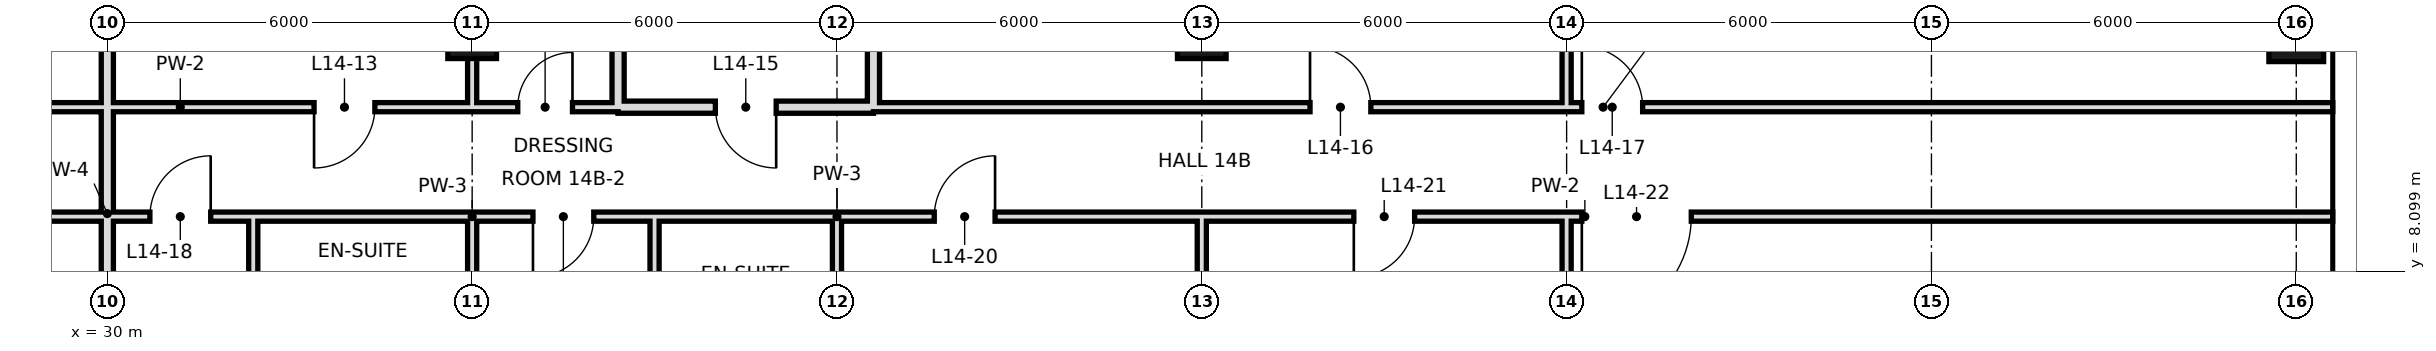
"""IFC4 building model, lengths in metres.
Left out: names, types, materials, properties, quantities, classifications, styles, units other than length and angle.
Written with IfcOpenShell. Run it as: python <this file> out.ifc"""

import sys

from ifc_helpers import new_model, si_unit, direction, frame, frame_2d, origin, origin_2d, place, context, subcontext, project, spatial, rectangle, hollow_rectangle, extrude, element, fill, save


model = new_model("IFC4")
c1 = context("Model", 3, precision=1e-05, world=origin(), true_north=direction((0.0, 1.0)))
c2 = subcontext(c1, "Body", "Model", "MODEL_VIEW")
j1 = project(units=[si_unit("LENGTHUNIT", "METRE"), si_unit("PLANEANGLEUNIT", "RADIAN")], contexts=[c1])
p1 = place(None, origin())
s1 = spatial("IfcSite", under=j1, at=p1, CompositionType="ELEMENT")
p2 = place(p1, origin())
s2 = spatial("IfcBuilding", under=s1, at=p2, CompositionType="ELEMENT")
p3 = place(p2, frame((0.0, 0.0, 71.4)))
s3 = spatial("IfcBuildingStorey", under=s2, at=p3, CompositionType="ELEMENT", Elevation=71.4)
for number, where, z_axis, x_axis in (
    (1, (36.0, 12.0, 0.0), (0.0, 0.0, 1.0), (1.0, 0.0, 0.0)),
    (2, (48.0, 12.0, 0.0), (0.0, 0.0, 1.0), (1.0, 0.0, 0.0)),
):
    element("IfcColumn", number, at=place(p3, frame(where, z_axis=z_axis, x_axis=x_axis)), inside=s3, PredefinedType="COLUMN", context=c2, shape_type="SweptSolid", body=[
        extrude(hollow_rectangle(XDim=0.8, YDim=0.8, WallThickness=0.04, at=origin_2d()), origin(), (0.0, 0.0, 1.0), 3.6),
    ])
p4 = place(p3, frame((66.0, 12.0, 0.0), z_axis=(0.0, 0.0, 1.0), x_axis=(1.0, 0.0, 0.0)))
e3 = element("IfcColumn", 3, at=p4, inside=s3, PredefinedType="COLUMN", context=c2, shape_type="SweptSolid", body=[
    extrude(hollow_rectangle(XDim=0.9, YDim=0.9, WallThickness=0.045, at=origin_2d()), origin(), (0.0, 0.0, 1.0), 3.6),
])
p5 = place(p3, frame((30.0, -0.6, 0.0), z_axis=(0.0, 0.0, 1.0), x_axis=(0.0, 1.0, 0.0)))
e4 = element("IfcWall", 4, at=p5, inside=s3, PredefinedType="SOLIDWALL", context=c2, shape_type="SweptSolid", body=[
    extrude(rectangle(XDim=19.3, YDim=0.2, at=frame_2d((9.65, 0.0))), origin(), (0.0, 0.0, 1.0), 2.72),
])
p6 = place(p3, frame((32.4, 6.0, 0.0), z_axis=(0.0, 0.0, 1.0), x_axis=(0.0, 1.0, 0.0)))
e5 = element("IfcWall", 5, at=p6, inside=s3, PredefinedType="PARTITIONING", context=c2, shape_type="SweptSolid", body=[
    extrude(rectangle(XDim=3.0, YDim=0.15, at=frame_2d((1.5, 0.0))), origin(), (0.0, 0.0, 1.0), 3.42),
])
p7 = place(p3, frame((36.0, 6.0, 0.0), z_axis=(0.0, 0.0, 1.0), x_axis=(0.0, 1.0, 0.0)))
e6 = element("IfcWall", 6, at=p7, inside=s3, PredefinedType="PARTITIONING", context=c2, shape_type="SweptSolid", body=[
    extrude(rectangle(XDim=3.0, YDim=0.15, at=frame_2d((1.5, 0.0))), origin(), (0.0, 0.0, 1.0), 2.72),
])
p8 = place(p3, frame((36.0, 10.8, 0.0), z_axis=(0.0, 0.0, 1.0), x_axis=(0.0, 1.0, 0.0)))
e7 = element("IfcWall", 7, at=p8, inside=s3, PredefinedType="PARTITIONING", context=c2, shape_type="SweptSolid", body=[
    extrude(rectangle(XDim=7.9, YDim=0.15, at=frame_2d((3.95, 0.0))), origin(), (0.0, 0.0, 1.0), 2.72),
])
p9 = place(p3, frame((38.4, 10.8, 0.0), z_axis=(0.0, 0.0, 1.0), x_axis=(0.0, 1.0, 0.0)))
e8 = element("IfcWall", 8, at=p9, inside=s3, PredefinedType="SOLIDWALL", context=c2, shape_type="SweptSolid", body=[
    extrude(rectangle(XDim=7.9, YDim=0.2, at=frame_2d((3.95, 0.0))), origin(), (0.0, 0.0, 1.0), 2.72),
])
p10 = place(p3, frame((39.0, 6.0, 0.0), z_axis=(0.0, 0.0, 1.0), x_axis=(0.0, 1.0, 0.0)))
e9 = element("IfcWall", 9, at=p10, inside=s3, PredefinedType="PARTITIONING", context=c2, shape_type="SweptSolid", body=[
    extrude(rectangle(XDim=3.0, YDim=0.15, at=frame_2d((1.5, 0.0))), origin(), (0.0, 0.0, 1.0), 3.42),
])
p11 = place(p3, frame((42.0, 6.0, 0.0), z_axis=(0.0, 0.0, 1.0), x_axis=(0.0, 1.0, 0.0)))
e10 = element("IfcWall", 10, at=p11, inside=s3, PredefinedType="PARTITIONING", context=c2, shape_type="SweptSolid", body=[
    extrude(rectangle(XDim=3.0, YDim=0.15, at=frame_2d((1.5, 0.0))), origin(), (0.0, 0.0, 1.0), 2.72),
])
p12 = place(p3, frame((42.6, 10.8, 0.0), z_axis=(0.0, 0.0, 1.0), x_axis=(0.0, 1.0, 0.0)))
e11 = element("IfcWall", 11, at=p12, inside=s3, PredefinedType="SOLIDWALL", context=c2, shape_type="SweptSolid", body=[
    extrude(rectangle(XDim=7.9, YDim=0.2, at=frame_2d((3.95, 0.0))), origin(), (0.0, 0.0, 1.0), 2.72),
])
p13 = place(p3, frame((48.0, 0.0, 0.0), z_axis=(0.0, 0.0, 1.0), x_axis=(0.0, 1.0, 0.0)))
e12 = element("IfcWall", 12, at=p13, inside=s3, PredefinedType="PARTITIONING", context=c2, shape_type="SweptSolid", body=[
    extrude(rectangle(XDim=9.0, YDim=0.15, at=frame_2d((4.5, 0.0))), origin(), (0.0, 0.0, 1.0), 2.72),
])
p14 = place(p3, frame((54.0, -0.6, 0.0), z_axis=(0.0, 0.0, 1.0), x_axis=(0.0, 1.0, 0.0)))
e13 = element("IfcWall", 13, at=p14, inside=s3, PredefinedType="PARTITIONING", context=c2, shape_type="SweptSolid", body=[
    extrude(rectangle(XDim=9.6, YDim=0.15, at=frame_2d((4.8, 0.0))), origin(), (0.0, 0.0, 1.0), 3.42),
])
p15 = place(p3, frame((54.0, 10.8, 0.0), z_axis=(0.0, 0.0, 1.0), x_axis=(0.0, 1.0, 0.0)))
e14 = element("IfcWall", 14, at=p15, inside=s3, PredefinedType="PARTITIONING", context=c2, shape_type="SweptSolid", body=[
    extrude(rectangle(XDim=7.2, YDim=0.15, at=frame_2d((3.6, 0.0))), origin(), (0.0, 0.0, 1.0), 3.42),
])
p16 = place(p3, frame((38.4, 10.8, 0.0), z_axis=(0.0, 0.0, 1.0), x_axis=(1.0, 0.0, 0.0)))
e15 = element("IfcWall", 15, at=p16, inside=s3, PredefinedType="SOLIDWALL", context=c2, shape_type="SweptSolid", body=[
    extrude(rectangle(XDim=4.2, YDim=0.2, at=frame_2d((2.1, 0.0))), origin(), (0.0, 0.0, 1.0), 2.72),
])
p17 = place(p16, frame((1.6, 0.0, 0.0)))
e16 = element("IfcOpeningElement", 16, at=p17, cuts=e15, PredefinedType="OPENING", context=c2, shape_type="SweptSolid", body=[
    extrude(rectangle(XDim=1.0, YDim=2.4, at=frame_2d((0.5, 1.2))), frame((0.0, 0.11, 0.0), z_axis=(0.0, -1.0, 0.0), x_axis=(1.0, 0.0, 0.0)), (0.0, 0.0, 1.0), 0.22),
])
p18 = place(p3, frame((26.4, 10.8, 0.0), z_axis=(0.0, 0.0, 1.0), x_axis=(1.0, 0.0, 0.0)))
e17 = element("IfcWall", 17, at=p18, inside=s3, PredefinedType="PARTITIONING", context=c2, shape_type="SweptSolid", body=[
    extrude(rectangle(XDim=9.6, YDim=0.15, at=frame_2d((4.8, 0.0))), origin(), (0.0, 0.0, 1.0), 3.42),
])
p19 = place(p18, frame((1.3, 0.0, 0.0)))
e18 = element("IfcOpeningElement", 18, at=p19, cuts=e17, PredefinedType="OPENING", context=c2, shape_type="SweptSolid", body=[
    extrude(rectangle(XDim=1.0, YDim=2.4, at=frame_2d((0.5, 1.2))), frame((0.0, 0.085, 0.0), z_axis=(0.0, -1.0, 0.0), x_axis=(1.0, 0.0, 0.0)), (0.0, 0.0, 1.0), 0.17),
])
p20 = place(p18, frame((7.0, 0.0, 0.0)))
e19 = element("IfcOpeningElement", 19, at=p20, cuts=e17, PredefinedType="OPENING", context=c2, shape_type="SweptSolid", body=[
    extrude(rectangle(XDim=1.0, YDim=2.4, at=frame_2d((0.5, 1.2))), frame((0.0, 0.085, 0.0), z_axis=(0.0, -1.0, 0.0), x_axis=(1.0, 0.0, 0.0)), (0.0, 0.0, 1.0), 0.17),
])
p21 = place(p3, frame((42.6, 10.8, 0.0), z_axis=(0.0, 0.0, 1.0), x_axis=(1.0, 0.0, 0.0)))
e20 = element("IfcWall", 20, at=p21, inside=s3, PredefinedType="PARTITIONING", context=c2, shape_type="SweptSolid", body=[
    extrude(rectangle(XDim=24.0, YDim=0.15, at=frame_2d((12.0, 0.0))), origin(), (0.0, 0.0, 1.0), 3.42),
])
p22 = place(p21, frame((7.18, 0.0, 0.0)))
e21 = element("IfcOpeningElement", 21, at=p22, cuts=e20, PredefinedType="OPENING", context=c2, shape_type="SweptSolid", body=[
    extrude(rectangle(XDim=1.0, YDim=2.4, at=frame_2d((0.5, 1.2))), frame((0.0, 0.085, 0.0), z_axis=(0.0, -1.0, 0.0), x_axis=(1.0, 0.0, 0.0)), (0.0, 0.0, 1.0), 0.17),
])
p23 = place(p21, frame((11.65, 0.0, 0.0)))
e22 = element("IfcOpeningElement", 22, at=p23, cuts=e20, PredefinedType="OPENING", context=c2, shape_type="SweptSolid", body=[
    extrude(rectangle(XDim=1.0, YDim=2.4, at=frame_2d((0.5, 1.2))), frame((0.0, 0.085, 0.0), z_axis=(0.0, -1.0, 0.0), x_axis=(1.0, 0.0, 0.0)), (0.0, 0.0, 1.0), 0.17),
])
p24 = place(p3, frame((36.0, 10.8, 0.0), z_axis=(0.0, 0.0, 1.0), x_axis=(1.0, 0.0, 0.0)))
e23 = element("IfcWall", 23, at=p24, inside=s3, PredefinedType="PARTITIONING", context=c2, shape_type="SweptSolid", body=[
    extrude(rectangle(XDim=2.4, YDim=0.15, at=frame_2d((1.2, 0.0))), origin(), (0.0, 0.0, 1.0), 3.42),
])
p25 = place(p24, frame((0.75, 0.0, 0.0)))
e24 = element("IfcOpeningElement", 24, at=p25, cuts=e23, PredefinedType="OPENING", context=c2, shape_type="SweptSolid", body=[
    extrude(rectangle(XDim=0.9, YDim=2.4, at=frame_2d((0.45, 1.2))), frame((0.0, 0.085, 0.0), z_axis=(0.0, -1.0, 0.0), x_axis=(1.0, 0.0, 0.0)), (0.0, 0.0, 1.0), 0.17),
])
p26 = place(p3, frame((30.0, 9.0, 0.0), z_axis=(0.0, 0.0, 1.0), x_axis=(1.0, 0.0, 0.0)))
e25 = element("IfcWall", 25, at=p26, inside=s3, PredefinedType="PARTITIONING", context=c2, shape_type="SweptSolid", body=[
    extrude(rectangle(XDim=2.4, YDim=0.15, at=frame_2d((1.2, 0.0))), origin(), (0.0, 0.0, 1.0), 3.42),
])
p27 = place(p26, frame((0.7, 0.0, 0.0)))
e26 = element("IfcOpeningElement", 26, at=p27, cuts=e25, PredefinedType="OPENING", context=c2, shape_type="SweptSolid", body=[
    extrude(rectangle(XDim=1.0, YDim=2.4, at=frame_2d((0.5, 1.2))), frame((0.0, 0.085, 0.0), z_axis=(0.0, -1.0, 0.0), x_axis=(1.0, 0.0, 0.0)), (0.0, 0.0, 1.0), 0.17),
])
p28 = place(p3, frame((36.0, 9.0, 0.0), z_axis=(0.0, 0.0, 1.0), x_axis=(1.0, 0.0, 0.0)))
e27 = element("IfcWall", 27, at=p28, inside=s3, PredefinedType="PARTITIONING", context=c2, shape_type="SweptSolid", body=[
    extrude(rectangle(XDim=3.0, YDim=0.15, at=frame_2d((1.5, 0.0))), origin(), (0.0, 0.0, 1.0), 3.42),
])
p29 = place(p28, frame((1.0, 0.0, 0.0)))
e28 = element("IfcOpeningElement", 28, at=p29, cuts=e27, PredefinedType="OPENING", context=c2, shape_type="SweptSolid", body=[
    extrude(rectangle(XDim=1.0, YDim=2.4, at=frame_2d((0.5, 1.2))), frame((0.0, 0.085, 0.0), z_axis=(0.0, -1.0, 0.0), x_axis=(1.0, 0.0, 0.0)), (0.0, 0.0, 1.0), 0.17),
])
p30 = place(p3, frame((42.0, 9.0, 0.0), z_axis=(0.0, 0.0, 1.0), x_axis=(1.0, 0.0, 0.0)))
e29 = element("IfcWall", 29, at=p30, inside=s3, PredefinedType="PARTITIONING", context=c2, shape_type="SweptSolid", body=[
    extrude(rectangle(XDim=24.6, YDim=0.15, at=frame_2d((12.3, 0.0))), origin(), (0.0, 0.0, 1.0), 3.42),
])
p31 = place(p30, frame((1.6, 0.0, 0.0)))
e30 = element("IfcOpeningElement", 30, at=p31, cuts=e29, PredefinedType="OPENING", context=c2, shape_type="SweptSolid", body=[
    extrude(rectangle(XDim=1.0, YDim=2.4, at=frame_2d((0.5, 1.2))), frame((0.0, 0.085, 0.0), z_axis=(0.0, -1.0, 0.0), x_axis=(1.0, 0.0, 0.0)), (0.0, 0.0, 1.0), 0.17),
])
p32 = place(p30, frame((8.5, 0.0, 0.0)))
e31 = element("IfcOpeningElement", 31, at=p32, cuts=e29, PredefinedType="OPENING", context=c2, shape_type="SweptSolid", body=[
    extrude(rectangle(XDim=1.0, YDim=2.4, at=frame_2d((0.5, 1.2))), frame((0.0, 0.085, 0.0), z_axis=(0.0, -1.0, 0.0), x_axis=(1.0, 0.0, 0.0)), (0.0, 0.0, 1.0), 0.17),
])
p33 = place(p30, frame((12.25, 0.0, 0.0)))
e32 = element("IfcOpeningElement", 32, at=p33, cuts=e29, PredefinedType="OPENING", context=c2, shape_type="SweptSolid", body=[
    extrude(rectangle(XDim=1.8, YDim=2.4, at=frame_2d((0.9, 1.2))), frame((0.0, 0.085, 0.0), z_axis=(0.0, -1.0, 0.0), x_axis=(1.0, 0.0, 0.0)), (0.0, 0.0, 1.0), 0.17),
])
for number, where, z_axis, x_axis in (
    (33, (26.4, 9.0, 0.0), (0.0, 0.0, 1.0), (1.0, 0.0, 0.0)),
    (34, (32.4, 9.0, 0.0), (0.0, 0.0, 1.0), (1.0, 0.0, 0.0)),
):
    element("IfcWall", number, at=place(p3, frame(where, z_axis=z_axis, x_axis=x_axis)), inside=s3, PredefinedType="PARTITIONING", context=c2, shape_type="SweptSolid", body=[
        extrude(rectangle(XDim=3.6, YDim=0.15, at=frame_2d((1.8, 0.0))), origin(), (0.0, 0.0, 1.0), 3.42),
    ])
p34 = place(p3, frame((39.0, 9.0, 0.0), z_axis=(0.0, 0.0, 1.0), x_axis=(1.0, 0.0, 0.0)))
e35 = element("IfcWall", 35, at=p34, inside=s3, PredefinedType="PARTITIONING", context=c2, shape_type="SweptSolid", body=[
    extrude(rectangle(XDim=3.0, YDim=0.15, at=frame_2d((1.5, 0.0))), origin(), (0.0, 0.0, 1.0), 3.42),
])
p35 = place(p20, frame((1.0, 0.0, 0.0), z_axis=(0.0, 0.0, 1.0), x_axis=(-1.0, 0.0, 0.0)))
e36 = element("IfcDoor", 36, at=p35, inside=s3, OperationType="SINGLE_SWING_RIGHT", PredefinedType="DOOR", context=c2, shape_type="SweptSolid", body=[
    extrude(rectangle(XDim=1.0, YDim=2.4, at=frame_2d((0.5, 1.2))), frame((0.0, 0.025, 0.0), z_axis=(0.0, -1.0, 0.0), x_axis=(1.0, 0.0, 0.0)), (0.0, 0.0, 1.0), 0.05),
])
fill(e19, e36)
p36 = place(p25, frame((0.9, 0.0, 0.0), z_axis=(0.0, 0.0, 1.0), x_axis=(-1.0, 0.0, 0.0)))
e37 = element("IfcDoor", 37, at=p36, inside=s3, OperationType="SINGLE_SWING_LEFT", PredefinedType="DOOR", context=c2, shape_type="SweptSolid", body=[
    extrude(rectangle(XDim=0.9, YDim=2.4, at=frame_2d((0.45, 1.2))), frame((0.0, 0.025, 0.0), z_axis=(0.0, -1.0, 0.0), x_axis=(1.0, 0.0, 0.0)), (0.0, 0.0, 1.0), 0.05),
])
fill(e24, e37)
p37 = place(p17, origin())
e38 = element("IfcDoor", 38, at=p37, inside=s3, OperationType="SINGLE_SWING_RIGHT", PredefinedType="DOOR", context=c2, shape_type="SweptSolid", body=[
    extrude(rectangle(XDim=1.0, YDim=2.4, at=frame_2d((0.5, 1.2))), frame((0.0, 0.025, 0.0), z_axis=(0.0, -1.0, 0.0), x_axis=(1.0, 0.0, 0.0)), (0.0, 0.0, 1.0), 0.05),
])
fill(e16, e38)
p38 = place(p22, origin())
e39 = element("IfcDoor", 39, at=p38, inside=s3, OperationType="SINGLE_SWING_LEFT", PredefinedType="DOOR", context=c2, shape_type="SweptSolid", body=[
    extrude(rectangle(XDim=1.0, YDim=2.4, at=frame_2d((0.5, 1.2))), frame((0.0, 0.025, 0.0), z_axis=(0.0, -1.0, 0.0), x_axis=(1.0, 0.0, 0.0)), (0.0, 0.0, 1.0), 0.05),
])
fill(e21, e39)
p39 = place(p23, origin())
e40 = element("IfcDoor", 40, at=p39, inside=s3, OperationType="SINGLE_SWING_LEFT", PredefinedType="DOOR", context=c2, shape_type="SweptSolid", body=[
    extrude(rectangle(XDim=1.0, YDim=2.4, at=frame_2d((0.5, 1.2))), frame((0.0, 0.025, 0.0), z_axis=(0.0, -1.0, 0.0), x_axis=(1.0, 0.0, 0.0)), (0.0, 0.0, 1.0), 0.05),
])
fill(e22, e40)
p40 = place(p27, frame((1.0, 0.0, 0.0), z_axis=(0.0, 0.0, 1.0), x_axis=(-1.0, 0.0, 0.0)))
e41 = element("IfcDoor", 41, at=p40, inside=s3, OperationType="SINGLE_SWING_LEFT", PredefinedType="DOOR", context=c2, shape_type="SweptSolid", body=[
    extrude(rectangle(XDim=1.0, YDim=2.4, at=frame_2d((0.5, 1.2))), frame((0.0, 0.025, 0.0), z_axis=(0.0, -1.0, 0.0), x_axis=(1.0, 0.0, 0.0)), (0.0, 0.0, 1.0), 0.05),
])
fill(e26, e41)
p41 = place(p29, frame((1.0, 0.0, 0.0), z_axis=(0.0, 0.0, 1.0), x_axis=(-1.0, 0.0, 0.0)))
e42 = element("IfcDoor", 42, at=p41, inside=s3, OperationType="SINGLE_SWING_RIGHT", PredefinedType="DOOR", context=c2, shape_type="SweptSolid", body=[
    extrude(rectangle(XDim=1.0, YDim=2.4, at=frame_2d((0.5, 1.2))), frame((0.0, 0.025, 0.0), z_axis=(0.0, -1.0, 0.0), x_axis=(1.0, 0.0, 0.0)), (0.0, 0.0, 1.0), 0.05),
])
fill(e28, e42)
p42 = place(p31, frame((1.0, 0.0, 0.0), z_axis=(0.0, 0.0, 1.0), x_axis=(-1.0, 0.0, 0.0)))
e43 = element("IfcDoor", 43, at=p42, inside=s3, OperationType="SINGLE_SWING_LEFT", PredefinedType="DOOR", context=c2, shape_type="SweptSolid", body=[
    extrude(rectangle(XDim=1.0, YDim=2.4, at=frame_2d((0.5, 1.2))), frame((0.0, 0.025, 0.0), z_axis=(0.0, -1.0, 0.0), x_axis=(1.0, 0.0, 0.0)), (0.0, 0.0, 1.0), 0.05),
])
fill(e30, e43)
p43 = place(p32, frame((1.0, 0.0, 0.0), z_axis=(0.0, 0.0, 1.0), x_axis=(-1.0, 0.0, 0.0)))
e44 = element("IfcDoor", 44, at=p43, inside=s3, OperationType="SINGLE_SWING_RIGHT", PredefinedType="DOOR", context=c2, shape_type="SweptSolid", body=[
    extrude(rectangle(XDim=1.0, YDim=2.4, at=frame_2d((0.5, 1.2))), frame((0.0, 0.025, 0.0), z_axis=(0.0, -1.0, 0.0), x_axis=(1.0, 0.0, 0.0)), (0.0, 0.0, 1.0), 0.05),
])
fill(e31, e44)
p44 = place(p33, frame((1.8, 0.0, 0.0), z_axis=(0.0, 0.0, 1.0), x_axis=(-1.0, 0.0, 0.0)))
e45 = element("IfcDoor", 45, at=p44, inside=s3, OperationType="SINGLE_SWING_RIGHT", PredefinedType="DOOR", context=c2, shape_type="SweptSolid", body=[
    extrude(rectangle(XDim=1.8, YDim=2.4, at=frame_2d((0.9, 1.2))), frame((0.0, 0.025, 0.0), z_axis=(0.0, -1.0, 0.0), x_axis=(1.0, 0.0, 0.0)), (0.0, 0.0, 1.0), 0.05),
])
fill(e32, e45)
save(model, sys.argv[1])
